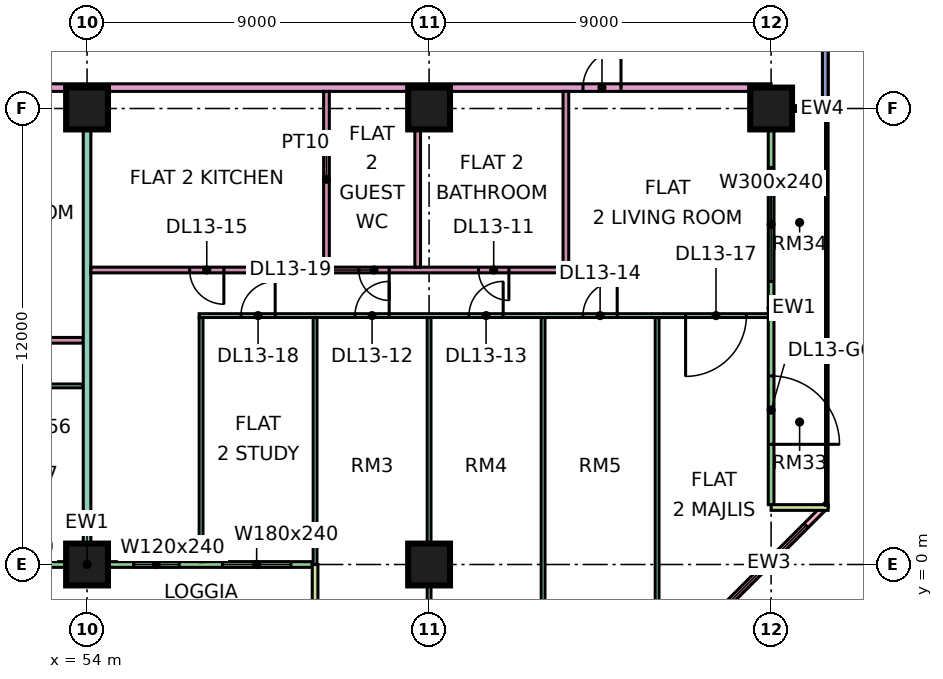
"""IFC4 building model, lengths in metres.
Left out: names, types, materials, properties, quantities, classifications, styles, units other than length and angle.
Written with IfcOpenShell. Run it as: python <this file> out.ifc"""

import sys

from ifc_helpers import new_model, si_unit, direction, frame, frame_2d, origin, origin_2d, place, context, subcontext, project, spatial, rectangle, extrude, element, fill, save


model = new_model("IFC4")
c1 = context("Model", 3, precision=1e-05, world=origin(), true_north=direction((0.0, 1.0)))
c2 = subcontext(c1, "Body", "Model", "MODEL_VIEW")
j1 = project(units=[si_unit("LENGTHUNIT", "METRE"), si_unit("PLANEANGLEUNIT", "RADIAN")], contexts=[c1])
p1 = place(None, origin())
s1 = spatial("IfcSite", under=j1, at=p1, CompositionType="ELEMENT")
p2 = place(p1, origin())
s2 = spatial("IfcBuilding", under=s1, at=p2, CompositionType="ELEMENT")
p3 = place(p2, frame((0.0, 0.0, 63.9)))
s3 = spatial("IfcBuildingStorey", under=s2, at=p3, CompositionType="ELEMENT", Elevation=63.9)
for number, where, z_axis, x_axis in (
    (1, (54.0, 0.0, 0.0), (0.0, 0.0, 1.0), (1.0, 0.0, 0.0)),
    (2, (54.0, 12.0, 0.0), (0.0, 0.0, 1.0), (1.0, 0.0, 0.0)),
    (3, (63.0, 0.0, 0.0), (0.0, 0.0, 1.0), (1.0, 0.0, 0.0)),
    (4, (63.0, 12.0, 0.0), (0.0, 0.0, 1.0), (1.0, 0.0, 0.0)),
    (5, (72.0, 12.0, 0.0), (0.0, 0.0, 1.0), (1.0, 0.0, 0.0)),
):
    element("IfcColumn", number, at=place(p3, frame(where, z_axis=z_axis, x_axis=x_axis)), inside=s3, PredefinedType="COLUMN", context=c2, shape_type="SweptSolid", body=[
        extrude(rectangle(XDim=1.1, YDim=1.1, at=origin_2d()), origin(), (0.0, 0.0, 1.0), 3.75),
    ])
p4 = place(p3, frame((48.075, 0.0, 0.0), z_axis=(0.0, 0.0, 1.0), x_axis=(1.0, 0.0, 0.0)))
e6 = element("IfcWall", 6, at=p4, inside=s3, PredefinedType="SOLIDWALL", context=c2, shape_type="SweptSolid", body=[
    extrude(rectangle(XDim=11.85, YDim=0.15, at=frame_2d((5.925, 0.0))), origin(), (0.0, 0.0, 1.0), 3.35),
])
p5 = place(p4, frame((0.562, 0.0, 0.45)))
e7 = element("IfcOpeningElement", 7, at=p5, cuts=e6, PredefinedType="OPENING", context=c2, shape_type="SweptSolid", body=[
    extrude(rectangle(XDim=1.8, YDim=2.4, at=frame_2d((0.9, 1.2))), frame((0.0, 0.085, 0.0), z_axis=(0.0, -1.0, 0.0), x_axis=(1.0, 0.0, 0.0)), (0.0, 0.0, 1.0), 0.17),
])
p6 = place(p4, frame((3.5, 0.0, 0.45)))
e8 = element("IfcOpeningElement", 8, at=p6, cuts=e6, PredefinedType="OPENING", context=c2, shape_type="SweptSolid", body=[
    extrude(rectangle(XDim=1.2, YDim=2.4, at=frame_2d((0.6, 1.2))), frame((0.0, 0.085, 0.0), z_axis=(0.0, -1.0, 0.0), x_axis=(1.0, 0.0, 0.0)), (0.0, 0.0, 1.0), 0.17),
])
p7 = place(p4, frame((7.15, 0.0, 0.45)))
e9 = element("IfcOpeningElement", 9, at=p7, cuts=e6, PredefinedType="OPENING", context=c2, shape_type="SweptSolid", body=[
    extrude(rectangle(XDim=1.2, YDim=2.4, at=frame_2d((0.6, 1.2))), frame((0.0, 0.085, 0.0), z_axis=(0.0, -1.0, 0.0), x_axis=(1.0, 0.0, 0.0)), (0.0, 0.0, 1.0), 0.17),
])
p8 = place(p4, frame((9.488, 0.0, 0.45)))
e10 = element("IfcOpeningElement", 10, at=p8, cuts=e6, PredefinedType="OPENING", context=c2, shape_type="SweptSolid", body=[
    extrude(rectangle(XDim=1.8, YDim=2.4, at=frame_2d((0.9, 1.2))), frame((0.0, 0.085, 0.0), z_axis=(0.0, -1.0, 0.0), x_axis=(1.0, 0.0, 0.0)), (0.0, 0.0, 1.0), 0.17),
])
p9 = place(p3, frame((60.0, -1.5, 0.0), z_axis=(0.0, 0.0, 1.0), x_axis=(0.0, 1.0, 0.0)))
e11 = element("IfcWall", 11, at=p9, inside=s3, PredefinedType="SOLIDWALL", context=c2, shape_type="SweptSolid", body=[
    extrude(rectangle(XDim=1.5, YDim=0.15, at=frame_2d((0.75, 0.0))), origin(), (0.0, 0.0, 1.0), 3.35),
])
p10 = place(p3, frame((70.447, -1.447, 0.0), z_axis=(0.0, 0.0, 1.0), x_axis=(0.707106781187, 0.707106781187, 0.0)))
e12 = element("IfcWall", 12, at=p10, inside=s3, PredefinedType="SOLIDWALL", context=c2, shape_type="SweptSolid", body=[
    extrude(rectangle(XDim=4.243, YDim=0.15, at=frame_2d((2.121, 0.0))), origin(), (0.0, 0.0, 1.0), 3.35),
])
p11 = place(p10, frame((0.498, 0.0, 0.45)))
e13 = element("IfcOpeningElement", 13, at=p11, cuts=e12, PredefinedType="OPENING", context=c2, shape_type="SweptSolid", body=[
    extrude(rectangle(XDim=3.0, YDim=2.4, at=frame_2d((1.5, 1.2))), frame((0.0, 0.085, 0.0), z_axis=(0.0, -1.0, 0.0), x_axis=(1.0, 0.0, 0.0)), (0.0, 0.0, 1.0), 0.17),
])
p12 = place(p3, frame((72.0, 1.575, 0.0), z_axis=(0.0, 0.0, 1.0), x_axis=(0.0, 1.0, 0.0)))
e14 = element("IfcWall", 14, at=p12, inside=s3, PredefinedType="SOLIDWALL", context=c2, shape_type="SweptSolid", body=[
    extrude(rectangle(XDim=10.35, YDim=0.15, at=frame_2d((5.175, 0.0))), origin(), (0.0, 0.0, 1.0), 3.35),
])
p13 = place(p12, frame((1.587, 0.0, 0.0)))
e15 = element("IfcOpeningElement", 15, at=p13, cuts=e14, PredefinedType="OPENING", context=c2, shape_type="SweptSolid", body=[
    extrude(rectangle(XDim=1.8, YDim=2.4, at=frame_2d((0.9, 1.2))), frame((0.0, 0.085, 0.0), z_axis=(0.0, -1.0, 0.0), x_axis=(1.0, 0.0, 0.0)), (0.0, 0.0, 1.0), 0.17),
])
p14 = place(p12, frame((5.875, 0.0, 0.45)))
e16 = element("IfcOpeningElement", 16, at=p14, cuts=e14, PredefinedType="OPENING", context=c2, shape_type="SweptSolid", body=[
    extrude(rectangle(XDim=3.0, YDim=2.4, at=frame_2d((1.5, 1.2))), frame((0.0, 0.085, 0.0), z_axis=(0.0, -1.0, 0.0), x_axis=(1.0, 0.0, 0.0)), (0.0, 0.0, 1.0), 0.17),
])
for number, where, z_axis, x_axis in (
    (17, (73.5, 1.5, 0.0), (0.0, 0.0, 1.0), (-1.0, 0.0, 0.0)),
    (18, (73.5, 12.0, 0.0), (0.0, 0.0, 1.0), (-1.0, 0.0, 0.0)),
):
    element("IfcWall", number, at=place(p3, frame(where, z_axis=z_axis, x_axis=x_axis)), inside=s3, PredefinedType="SOLIDWALL", context=c2, shape_type="SweptSolid", body=[
        extrude(rectangle(XDim=1.5, YDim=0.15, at=frame_2d((0.75, 0.0))), origin(), (0.0, 0.0, 1.0), 3.35),
    ])
p15 = place(p3, frame((73.425, 12.075, 0.0), z_axis=(0.0, 0.0, 1.0), x_axis=(0.0, 1.0, 0.0)))
e19 = element("IfcWall", 19, at=p15, inside=s3, PredefinedType="SOLIDWALL", context=c2, shape_type="SweptSolid", body=[
    extrude(rectangle(XDim=10.425, YDim=0.15, at=frame_2d((5.212, 0.0))), origin(), (0.0, 0.0, 1.0), 3.35),
])
p16 = place(p15, frame((4.125, 0.0, 0.45)))
e20 = element("IfcOpeningElement", 20, at=p16, cuts=e19, PredefinedType="OPENING", context=c2, shape_type="SweptSolid", body=[
    extrude(rectangle(XDim=3.0, YDim=2.4, at=frame_2d((1.5, 1.2))), frame((0.0, 0.085, 0.0), z_axis=(0.0, -1.0, 0.0), x_axis=(1.0, 0.0, 0.0)), (0.0, 0.0, 1.0), 0.17),
])
p17 = place(p15, frame((8.175, 0.0, 0.45)))
e21 = element("IfcOpeningElement", 21, at=p17, cuts=e19, PredefinedType="OPENING", context=c2, shape_type="SweptSolid", body=[
    extrude(rectangle(XDim=1.8, YDim=2.4, at=frame_2d((0.9, 1.2))), frame((0.0, 0.085, 0.0), z_axis=(0.0, -1.0, 0.0), x_axis=(1.0, 0.0, 0.0)), (0.0, 0.0, 1.0), 0.17),
])
p18 = place(p3, frame((33.05, 4.7, 0.0), z_axis=(0.0, 0.0, 1.0), x_axis=(1.0, 0.0, 0.0)))
e22 = element("IfcWall", 22, at=p18, inside=s3, PredefinedType="PARTITIONING", context=c2, shape_type="SweptSolid", body=[
    extrude(rectangle(XDim=20.85, YDim=0.1, at=frame_2d((10.425, 0.0))), origin(), (0.0, 0.0, 1.0), 3.35),
])
p19 = place(p18, frame((10.0, 0.0, 0.0)))
e23 = element("IfcOpeningElement", 23, at=p19, cuts=e22, PredefinedType="OPENING", context=c2, shape_type="SweptSolid", body=[
    extrude(rectangle(XDim=0.9, YDim=2.1, at=frame_2d((0.45, 1.05))), frame((0.0, 0.06, 0.0), z_axis=(0.0, -1.0, 0.0), x_axis=(1.0, 0.0, 0.0)), (0.0, 0.0, 1.0), 0.12),
])
p20 = place(p18, frame((13.0, 0.0, 0.0)))
e24 = element("IfcOpeningElement", 24, at=p20, cuts=e22, PredefinedType="OPENING", context=c2, shape_type="SweptSolid", body=[
    extrude(rectangle(XDim=0.9, YDim=2.1, at=frame_2d((0.45, 1.05))), frame((0.0, 0.06, 0.0), z_axis=(0.0, -1.0, 0.0), x_axis=(1.0, 0.0, 0.0)), (0.0, 0.0, 1.0), 0.12),
])
p21 = place(p18, frame((16.0, 0.0, 0.0)))
e25 = element("IfcOpeningElement", 25, at=p21, cuts=e22, PredefinedType="OPENING", context=c2, shape_type="SweptSolid", body=[
    extrude(rectangle(XDim=0.9, YDim=2.1, at=frame_2d((0.45, 1.05))), frame((0.0, 0.06, 0.0), z_axis=(0.0, -1.0, 0.0), x_axis=(1.0, 0.0, 0.0)), (0.0, 0.0, 1.0), 0.12),
])
p22 = place(p18, frame((19.0, 0.0, 0.0)))
e26 = element("IfcOpeningElement", 26, at=p22, cuts=e22, PredefinedType="OPENING", context=c2, shape_type="SweptSolid", body=[
    extrude(rectangle(XDim=0.9, YDim=2.1, at=frame_2d((0.45, 1.05))), frame((0.0, 0.06, 0.0), z_axis=(0.0, -1.0, 0.0), x_axis=(1.0, 0.0, 0.0)), (0.0, 0.0, 1.0), 0.12),
])
p23 = place(p18, frame((4.0, 0.0, 0.0)))
e27 = element("IfcOpeningElement", 27, at=p23, cuts=e22, PredefinedType="OPENING", context=c2, shape_type="SweptSolid", body=[
    extrude(rectangle(XDim=0.9, YDim=2.1, at=frame_2d((0.45, 1.05))), frame((0.0, 0.06, 0.0), z_axis=(0.0, -1.0, 0.0), x_axis=(1.0, 0.0, 0.0)), (0.0, 0.0, 1.0), 0.12),
])
p24 = place(p3, frame((40.65, 12.55, 0.0), z_axis=(0.0, 0.0, 1.0), x_axis=(1.0, 0.0, 0.0)))
e28 = element("IfcWall", 28, at=p24, inside=s3, PredefinedType="PARTITIONING", context=c2, shape_type="SweptSolid", body=[
    extrude(rectangle(XDim=31.35, YDim=0.2, at=frame_2d((15.675, 0.0))), origin(), (0.0, 0.0, 1.0), 3.35),
])
p25 = place(p24, frame((26.4, 0.0, 0.0)))
e29 = element("IfcOpeningElement", 29, at=p25, cuts=e28, PredefinedType="OPENING", context=c2, shape_type="SweptSolid", body=[
    extrude(rectangle(XDim=1.0, YDim=2.1, at=frame_2d((0.5, 1.05))), frame((0.0, 0.11, 0.0), z_axis=(0.0, -1.0, 0.0), x_axis=(1.0, 0.0, 0.0)), (0.0, 0.0, 1.0), 0.22),
])
p26 = place(p24, frame((1.05, 0.0, 0.0)))
e30 = element("IfcOpeningElement", 30, at=p26, cuts=e28, PredefinedType="OPENING", context=c2, shape_type="SweptSolid", body=[
    extrude(rectangle(XDim=1.0, YDim=2.1, at=frame_2d((0.5, 1.05))), frame((0.0, 0.11, 0.0), z_axis=(0.0, -1.0, 0.0), x_axis=(1.0, 0.0, 0.0)), (0.0, 0.0, 1.0), 0.22),
])
p27 = place(p3, frame((43.575, 5.9, 0.0), z_axis=(0.0, 0.0, 1.0), x_axis=(1.0, 0.0, 0.0)))
e31 = element("IfcWall", 31, at=p27, inside=s3, PredefinedType="PARTITIONING", context=c2, shape_type="SweptSolid", body=[
    extrude(rectangle(XDim=10.325, YDim=0.15, at=frame_2d((5.163, 0.0))), origin(), (0.0, 0.0, 1.0), 3.35),
])
p28 = place(p27, frame((1.825, 0.0, 0.0)))
e32 = element("IfcOpeningElement", 32, at=p28, cuts=e31, PredefinedType="OPENING", context=c2, shape_type="SweptSolid", body=[
    extrude(rectangle(XDim=0.8, YDim=2.1, at=frame_2d((0.4, 1.05))), frame((0.0, 0.085, 0.0), z_axis=(0.0, -1.0, 0.0), x_axis=(1.0, 0.0, 0.0)), (0.0, 0.0, 1.0), 0.17),
])
p29 = place(p27, frame((6.975, 0.0, 0.0)))
e33 = element("IfcOpeningElement", 33, at=p29, cuts=e31, PredefinedType="OPENING", context=c2, shape_type="SweptSolid", body=[
    extrude(rectangle(XDim=0.9, YDim=2.1, at=frame_2d((0.45, 1.05))), frame((0.0, 0.085, 0.0), z_axis=(0.0, -1.0, 0.0), x_axis=(1.0, 0.0, 0.0)), (0.0, 0.0, 1.0), 0.17),
])
p30 = place(p3, frame((54.0, 0.074, 0.0), z_axis=(0.0, 0.0, 1.0), x_axis=(0.0, 1.0, 0.0)))
e34 = element("IfcWall", 34, at=p30, inside=s3, PredefinedType="PARTITIONING", context=c2, shape_type="SweptSolid", body=[
    extrude(rectangle(XDim=12.376, YDim=0.2, at=frame_2d((6.188, 0.0))), origin(), (0.0, 0.0, 1.0), 3.35),
])
p31 = place(p3, frame((54.1, 7.75, 0.0), z_axis=(0.0, 0.0, 1.0), x_axis=(1.0, 0.0, 0.0)))
e35 = element("IfcWall", 35, at=p31, inside=s3, PredefinedType="PARTITIONING", context=c2, shape_type="SweptSolid", body=[
    extrude(rectangle(XDim=12.575, YDim=0.15, at=frame_2d((6.288, 0.0))), origin(), (0.0, 0.0, 1.0), 3.35),
])
p32 = place(p31, frame((10.2, 0.0, 0.0)))
e36 = element("IfcOpeningElement", 36, at=p32, cuts=e35, PredefinedType="OPENING", context=c2, shape_type="SweptSolid", body=[
    extrude(rectangle(XDim=0.8, YDim=2.1, at=frame_2d((0.4, 1.05))), frame((0.0, 0.085, 0.0), z_axis=(0.0, -1.0, 0.0), x_axis=(1.0, 0.0, 0.0)), (0.0, 0.0, 1.0), 0.17),
])
p33 = place(p31, frame((2.6, 0.0, 0.0)))
e37 = element("IfcOpeningElement", 37, at=p33, cuts=e35, PredefinedType="OPENING", context=c2, shape_type="SweptSolid", body=[
    extrude(rectangle(XDim=0.9, YDim=2.1, at=frame_2d((0.45, 1.05))), frame((0.0, 0.085, 0.0), z_axis=(0.0, -1.0, 0.0), x_axis=(1.0, 0.0, 0.0)), (0.0, 0.0, 1.0), 0.17),
])
p34 = place(p31, frame((7.05, 0.0, 0.0)))
e38 = element("IfcOpeningElement", 38, at=p34, cuts=e35, PredefinedType="OPENING", context=c2, shape_type="SweptSolid", body=[
    extrude(rectangle(XDim=0.8, YDim=2.1, at=frame_2d((0.4, 1.05))), frame((0.0, 0.085, 0.0), z_axis=(0.0, -1.0, 0.0), x_axis=(1.0, 0.0, 0.0)), (0.0, 0.0, 1.0), 0.17),
])
p35 = place(p3, frame((56.95, 6.55, 0.0), z_axis=(0.0, 0.0, 1.0), x_axis=(1.0, 0.0, 0.0)))
e39 = element("IfcWall", 39, at=p35, inside=s3, PredefinedType="PARTITIONING", context=c2, shape_type="SweptSolid", body=[
    extrude(rectangle(XDim=14.976, YDim=0.1, at=frame_2d((7.488, 0.0))), origin(), (0.0, 0.0, 1.0), 3.35),
])
p36 = place(p35, frame((4.1, 0.0, 0.0)))
e40 = element("IfcOpeningElement", 40, at=p36, cuts=e39, PredefinedType="OPENING", context=c2, shape_type="SweptSolid", body=[
    extrude(rectangle(XDim=0.9, YDim=2.1, at=frame_2d((0.45, 1.05))), frame((0.0, 0.06, 0.0), z_axis=(0.0, -1.0, 0.0), x_axis=(1.0, 0.0, 0.0)), (0.0, 0.0, 1.0), 0.12),
])
p37 = place(p35, frame((7.1, 0.0, 0.0)))
e41 = element("IfcOpeningElement", 41, at=p37, cuts=e39, PredefinedType="OPENING", context=c2, shape_type="SweptSolid", body=[
    extrude(rectangle(XDim=0.9, YDim=2.1, at=frame_2d((0.45, 1.05))), frame((0.0, 0.06, 0.0), z_axis=(0.0, -1.0, 0.0), x_axis=(1.0, 0.0, 0.0)), (0.0, 0.0, 1.0), 0.12),
])
p38 = place(p35, frame((10.1, 0.0, 0.0)))
e42 = element("IfcOpeningElement", 42, at=p38, cuts=e39, PredefinedType="OPENING", context=c2, shape_type="SweptSolid", body=[
    extrude(rectangle(XDim=0.9, YDim=2.1, at=frame_2d((0.45, 1.05))), frame((0.0, 0.06, 0.0), z_axis=(0.0, -1.0, 0.0), x_axis=(1.0, 0.0, 0.0)), (0.0, 0.0, 1.0), 0.12),
])
p39 = place(p35, frame((12.8, 0.0, 0.0)))
e43 = element("IfcOpeningElement", 43, at=p39, cuts=e39, PredefinedType="OPENING", context=c2, shape_type="SweptSolid", body=[
    extrude(rectangle(XDim=1.6, YDim=2.1, at=frame_2d((0.8, 1.05))), frame((0.0, 0.06, 0.0), z_axis=(0.0, -1.0, 0.0), x_axis=(1.0, 0.0, 0.0)), (0.0, 0.0, 1.0), 0.12),
])
p40 = place(p35, frame((1.1, 0.0, 0.0)))
e44 = element("IfcOpeningElement", 44, at=p40, cuts=e39, PredefinedType="OPENING", context=c2, shape_type="SweptSolid", body=[
    extrude(rectangle(XDim=0.9, YDim=2.1, at=frame_2d((0.45, 1.05))), frame((0.0, 0.06, 0.0), z_axis=(0.0, -1.0, 0.0), x_axis=(1.0, 0.0, 0.0)), (0.0, 0.0, 1.0), 0.12),
])
p41 = place(p3, frame((57.0, 0.074, 0.0), z_axis=(0.0, 0.0, 1.0), x_axis=(0.0, 1.0, 0.0)))
e45 = element("IfcWall", 45, at=p41, inside=s3, PredefinedType="PARTITIONING", context=c2, shape_type="SweptSolid", body=[
    extrude(rectangle(XDim=6.426, YDim=0.1, at=frame_2d((3.213, 0.0))), origin(), (0.0, 0.0, 1.0), 3.35),
])
p42 = place(p3, frame((60.0, 0.0, 0.0), z_axis=(0.0, 0.0, 1.0), x_axis=(0.0, 1.0, 0.0)))
e46 = element("IfcWall", 46, at=p42, inside=s3, PredefinedType="PARTITIONING", context=c2, shape_type="SweptSolid", body=[
    extrude(rectangle(XDim=6.5, YDim=0.1, at=frame_2d((3.25, 0.0))), origin(), (0.0, 0.0, 1.0), 3.35),
])
for number, where, z_axis, x_axis in (
    (47, (60.3, 7.825, 0.0), (0.0, 0.0, 1.0), (0.0, 1.0, 0.0)),
    (48, (62.7, 7.825, 0.0), (0.0, 0.0, 1.0), (0.0, 1.0, 0.0)),
):
    element("IfcWall", number, at=place(p3, frame(where, z_axis=z_axis, x_axis=x_axis)), inside=s3, PredefinedType="PARTITIONING", context=c2, shape_type="SweptSolid", body=[
        extrude(rectangle(XDim=4.625, YDim=0.15, at=frame_2d((2.312, 0.0))), origin(), (0.0, 0.0, 1.0), 3.35),
    ])
for number, where, z_axis, x_axis in (
    (49, (63.0, -1.351, 0.0), (0.0, 0.0, 1.0), (0.0, 1.0, 0.0)),
    (50, (66.0, -1.351, 0.0), (0.0, 0.0, 1.0), (0.0, 1.0, 0.0)),
):
    element("IfcWall", number, at=place(p3, frame(where, z_axis=z_axis, x_axis=x_axis)), inside=s3, PredefinedType="PARTITIONING", context=c2, shape_type="SweptSolid", body=[
        extrude(rectangle(XDim=7.851, YDim=0.1, at=frame_2d((3.926, 0.0))), origin(), (0.0, 0.0, 1.0), 3.35),
    ])
p43 = place(p3, frame((66.6, 7.825, 0.0), z_axis=(0.0, 0.0, 1.0), x_axis=(0.0, 1.0, 0.0)))
e51 = element("IfcWall", 51, at=p43, inside=s3, PredefinedType="PARTITIONING", context=c2, shape_type="SweptSolid", body=[
    extrude(rectangle(XDim=4.625, YDim=0.15, at=frame_2d((2.312, 0.0))), origin(), (0.0, 0.0, 1.0), 3.35),
])
p44 = place(p3, frame((69.0, -1.351, 0.0), z_axis=(0.0, 0.0, 1.0), x_axis=(0.0, 1.0, 0.0)))
e52 = element("IfcWall", 52, at=p44, inside=s3, PredefinedType="PARTITIONING", context=c2, shape_type="SweptSolid", body=[
    extrude(rectangle(XDim=7.851, YDim=0.1, at=frame_2d((3.926, 0.0))), origin(), (0.0, 0.0, 1.0), 3.35),
])
p45 = place(p7, origin())
e53 = element("IfcWindow", 53, at=p45, inside=s3, PartitioningType="SINGLE_PANEL", PredefinedType="WINDOW", context=c2, shape_type="SweptSolid", body=[
    extrude(rectangle(XDim=1.2, YDim=2.4, at=frame_2d((0.6, 1.2))), frame((0.0, 0.03, 0.0), z_axis=(0.0, -1.0, 0.0), x_axis=(1.0, 0.0, 0.0)), (0.0, 0.0, 1.0), 0.06),
])
fill(e9, e53)
p46 = place(p8, origin())
e54 = element("IfcWindow", 54, at=p46, inside=s3, PartitioningType="SINGLE_PANEL", PredefinedType="WINDOW", context=c2, shape_type="SweptSolid", body=[
    extrude(rectangle(XDim=1.8, YDim=2.4, at=frame_2d((0.9, 1.2))), frame((0.0, 0.03, 0.0), z_axis=(0.0, -1.0, 0.0), x_axis=(1.0, 0.0, 0.0)), (0.0, 0.0, 1.0), 0.06),
])
fill(e10, e54)
p47 = place(p11, origin())
e55 = element("IfcWindow", 55, at=p47, inside=s3, PartitioningType="SINGLE_PANEL", PredefinedType="WINDOW", context=c2, shape_type="SweptSolid", body=[
    extrude(rectangle(XDim=3.0, YDim=2.4, at=frame_2d((1.5, 1.2))), frame((0.0, 0.03, 0.0), z_axis=(0.0, -1.0, 0.0), x_axis=(1.0, 0.0, 0.0)), (0.0, 0.0, 1.0), 0.06),
])
fill(e13, e55)
p48 = place(p13, frame((1.8, 0.0, 0.0), z_axis=(0.0, 0.0, 1.0), x_axis=(-1.0, 0.0, 0.0)))
e56 = element("IfcDoor", 56, at=p48, inside=s3, OperationType="DOUBLE_DOOR_SINGLE_SWING", PredefinedType="DOOR", context=c2, shape_type="SweptSolid", body=[
    extrude(rectangle(XDim=1.8, YDim=2.4, at=frame_2d((0.9, 1.2))), frame((0.0, 0.025, 0.0), z_axis=(0.0, -1.0, 0.0), x_axis=(1.0, 0.0, 0.0)), (0.0, 0.0, 1.0), 0.05),
])
fill(e15, e56)
p49 = place(p14, origin())
e57 = element("IfcWindow", 57, at=p49, inside=s3, PartitioningType="SINGLE_PANEL", PredefinedType="WINDOW", context=c2, shape_type="SweptSolid", body=[
    extrude(rectangle(XDim=3.0, YDim=2.4, at=frame_2d((1.5, 1.2))), frame((0.0, 0.03, 0.0), z_axis=(0.0, -1.0, 0.0), x_axis=(1.0, 0.0, 0.0)), (0.0, 0.0, 1.0), 0.06),
])
fill(e16, e57)
p50 = place(p32, origin())
e58 = element("IfcDoor", 58, at=p50, inside=s3, OperationType="SINGLE_SWING_RIGHT", PredefinedType="DOOR", context=c2, shape_type="SweptSolid", body=[
    extrude(rectangle(XDim=0.8, YDim=2.1, at=frame_2d((0.4, 1.05))), frame((0.0, 0.025, 0.0), z_axis=(0.0, -1.0, 0.0), x_axis=(1.0, 0.0, 0.0)), (0.0, 0.0, 1.0), 0.05),
])
fill(e36, e58)
p51 = place(p36, frame((0.9, 0.0, 0.0), z_axis=(0.0, 0.0, 1.0), x_axis=(-1.0, 0.0, 0.0)))
e59 = element("IfcDoor", 59, at=p51, inside=s3, OperationType="SINGLE_SWING_RIGHT", PredefinedType="DOOR", context=c2, shape_type="SweptSolid", body=[
    extrude(rectangle(XDim=0.9, YDim=2.1, at=frame_2d((0.45, 1.05))), frame((0.0, 0.025, 0.0), z_axis=(0.0, -1.0, 0.0), x_axis=(1.0, 0.0, 0.0)), (0.0, 0.0, 1.0), 0.05),
])
fill(e40, e59)
p52 = place(p37, frame((0.9, 0.0, 0.0), z_axis=(0.0, 0.0, 1.0), x_axis=(-1.0, 0.0, 0.0)))
e60 = element("IfcDoor", 60, at=p52, inside=s3, OperationType="SINGLE_SWING_RIGHT", PredefinedType="DOOR", context=c2, shape_type="SweptSolid", body=[
    extrude(rectangle(XDim=0.9, YDim=2.1, at=frame_2d((0.45, 1.05))), frame((0.0, 0.025, 0.0), z_axis=(0.0, -1.0, 0.0), x_axis=(1.0, 0.0, 0.0)), (0.0, 0.0, 1.0), 0.05),
])
fill(e41, e60)
p53 = place(p38, frame((0.9, 0.0, 0.0), z_axis=(0.0, 0.0, 1.0), x_axis=(-1.0, 0.0, 0.0)))
e61 = element("IfcDoor", 61, at=p53, inside=s3, OperationType="SINGLE_SWING_RIGHT", PredefinedType="DOOR", context=c2, shape_type="SweptSolid", body=[
    extrude(rectangle(XDim=0.9, YDim=2.1, at=frame_2d((0.45, 1.05))), frame((0.0, 0.025, 0.0), z_axis=(0.0, -1.0, 0.0), x_axis=(1.0, 0.0, 0.0)), (0.0, 0.0, 1.0), 0.05),
])
fill(e42, e61)
p54 = place(p33, origin())
e62 = element("IfcDoor", 62, at=p54, inside=s3, OperationType="SINGLE_SWING_RIGHT", PredefinedType="DOOR", context=c2, shape_type="SweptSolid", body=[
    extrude(rectangle(XDim=0.9, YDim=2.1, at=frame_2d((0.45, 1.05))), frame((0.0, 0.025, 0.0), z_axis=(0.0, -1.0, 0.0), x_axis=(1.0, 0.0, 0.0)), (0.0, 0.0, 1.0), 0.05),
])
fill(e37, e62)
p55 = place(p25, frame((1.0, 0.0, 0.0), z_axis=(0.0, 0.0, 1.0), x_axis=(-1.0, 0.0, 0.0)))
e63 = element("IfcDoor", 63, at=p55, inside=s3, OperationType="SINGLE_SWING_RIGHT", PredefinedType="DOOR", context=c2, shape_type="SweptSolid", body=[
    extrude(rectangle(XDim=1.0, YDim=2.1, at=frame_2d((0.5, 1.05))), frame((0.0, 0.025, 0.0), z_axis=(0.0, -1.0, 0.0), x_axis=(1.0, 0.0, 0.0)), (0.0, 0.0, 1.0), 0.05),
])
fill(e29, e63)
p56 = place(p39, frame((1.6, 0.0, 0.0), z_axis=(0.0, 0.0, 1.0), x_axis=(-1.0, 0.0, 0.0)))
e64 = element("IfcDoor", 64, at=p56, inside=s3, OperationType="DOUBLE_DOOR_SINGLE_SWING", PredefinedType="DOOR", context=c2, shape_type="SweptSolid", body=[
    extrude(rectangle(XDim=1.6, YDim=2.1, at=frame_2d((0.8, 1.05))), frame((0.0, 0.025, 0.0), z_axis=(0.0, -1.0, 0.0), x_axis=(1.0, 0.0, 0.0)), (0.0, 0.0, 1.0), 0.05),
])
fill(e43, e64)
p57 = place(p40, frame((0.9, 0.0, 0.0), z_axis=(0.0, 0.0, 1.0), x_axis=(-1.0, 0.0, 0.0)))
e65 = element("IfcDoor", 65, at=p57, inside=s3, OperationType="SINGLE_SWING_RIGHT", PredefinedType="DOOR", context=c2, shape_type="SweptSolid", body=[
    extrude(rectangle(XDim=0.9, YDim=2.1, at=frame_2d((0.45, 1.05))), frame((0.0, 0.025, 0.0), z_axis=(0.0, -1.0, 0.0), x_axis=(1.0, 0.0, 0.0)), (0.0, 0.0, 1.0), 0.05),
])
fill(e44, e65)
p58 = place(p34, origin())
e66 = element("IfcDoor", 66, at=p58, inside=s3, OperationType="SINGLE_SWING_RIGHT", PredefinedType="DOOR", context=c2, shape_type="SweptSolid", body=[
    extrude(rectangle(XDim=0.8, YDim=2.1, at=frame_2d((0.4, 1.05))), frame((0.0, 0.025, 0.0), z_axis=(0.0, -1.0, 0.0), x_axis=(1.0, 0.0, 0.0)), (0.0, 0.0, 1.0), 0.05),
])
fill(e38, e66)
save(model, sys.argv[1])
